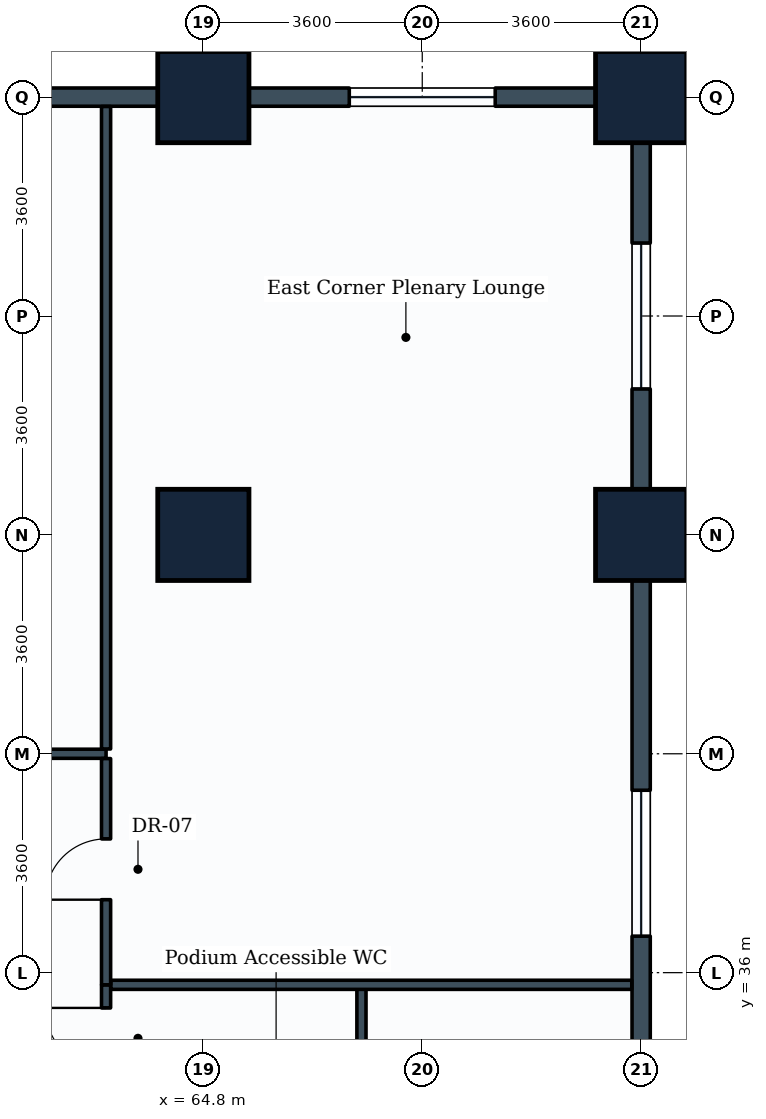
"""IFC4 building model, lengths in metres.
Left out: names, types, materials, properties, quantities, classifications, styles, units other than length and angle.
Written with IfcOpenShell. Run it as: python <this file> out.ifc"""

import sys

from ifc_helpers import new_model, si_unit, direction, frame, frame_2d, origin, origin_2d, place, context, subcontext, project, spatial, rectangle, extrude, element, fill, save


model = new_model("IFC4")
c1 = context("Model", 3, precision=1e-05, world=origin(), true_north=direction((0.0, 1.0)))
c2 = subcontext(c1, "Body", "Model", "MODEL_VIEW")
j1 = project(units=[si_unit("LENGTHUNIT", "METRE"), si_unit("PLANEANGLEUNIT", "RADIAN")], contexts=[c1])
p1 = place(None, origin())
s1 = spatial("IfcSite", under=j1, at=p1, CompositionType="ELEMENT")
p2 = place(p1, origin())
s2 = spatial("IfcBuilding", under=s1, at=p2, CompositionType="ELEMENT")
p3 = place(p2, frame((0.0, 0.0, 5.4)))
s3 = spatial("IfcBuildingStorey", under=s2, at=p3, CompositionType="ELEMENT", Elevation=5.4)
for number, where, z_axis, x_axis in (
    (1, (64.8, 43.2, 0.0), (0.0, 0.0, 1.0), (1.0, 0.0, 0.0)),
    (2, (64.8, 50.4, 0.0), (0.0, 0.0, 1.0), (1.0, 0.0, 0.0)),
    (3, (72.0, 43.2, 0.0), (0.0, 0.0, 1.0), (1.0, 0.0, 0.0)),
    (4, (72.0, 50.4, 0.0), (0.0, 0.0, 1.0), (1.0, 0.0, 0.0)),
):
    element("IfcColumn", number, at=place(p3, frame(where, z_axis=z_axis, x_axis=x_axis)), inside=s3, PredefinedType="COLUMN", context=c2, shape_type="SweptSolid", body=[
        extrude(rectangle(XDim=1.5, YDim=1.5, at=origin_2d()), origin(), (0.0, 0.0, 1.0), 4.8),
    ])
p4 = place(p3, frame((72.0, 43.2, 0.0), z_axis=(0.0, 0.0, 1.0), x_axis=(0.0, -1.0, 0.0)))
e5 = element("IfcWall", 5, at=p4, inside=s3, PredefinedType="STANDARD", context=c2, shape_type="SweptSolid", body=[
    extrude(rectangle(XDim=10.8, YDim=0.3, at=frame_2d((5.4, 0.0))), origin(), (0.0, 0.0, 1.0), 3.83),
])
p5 = place(p4, frame((4.2, 0.0, 0.85)))
e6 = element("IfcOpeningElement", 6, at=p5, cuts=e5, PredefinedType="OPENING", context=c2, shape_type="SweptSolid", body=[
    extrude(rectangle(XDim=2.4, YDim=1.6, at=frame_2d((1.2, 0.8))), frame((0.0, 0.16, 0.0), z_axis=(0.0, -1.0, 0.0), x_axis=(1.0, 0.0, 0.0)), (0.0, 0.0, 1.0), 0.32),
])
p6 = place(p3, frame((72.0, 50.4, 0.0), z_axis=(0.0, 0.0, 1.0), x_axis=(0.0, -1.0, 0.0)))
e7 = element("IfcWall", 7, at=p6, inside=s3, PredefinedType="STANDARD", context=c2, shape_type="SweptSolid", body=[
    extrude(rectangle(XDim=7.2, YDim=0.3, at=frame_2d((3.6, 0.0))), origin(), (0.0, 0.0, 1.0), 3.83),
])
p7 = place(p6, frame((2.4, 0.0, 0.85)))
e8 = element("IfcOpeningElement", 8, at=p7, cuts=e7, PredefinedType="OPENING", context=c2, shape_type="SweptSolid", body=[
    extrude(rectangle(XDim=2.4, YDim=1.6, at=frame_2d((1.2, 0.8))), frame((0.0, 0.16, 0.0), z_axis=(0.0, -1.0, 0.0), x_axis=(1.0, 0.0, 0.0)), (0.0, 0.0, 1.0), 0.32),
])
p8 = place(p3, frame((54.0, 50.4, 0.0), z_axis=(0.0, 0.0, 1.0), x_axis=(1.0, 0.0, 0.0)))
e9 = element("IfcWall", 9, at=p8, inside=s3, PredefinedType="STANDARD", context=c2, shape_type="SweptSolid", body=[
    extrude(rectangle(XDim=10.8, YDim=0.3, at=frame_2d((5.4, 0.0))), origin(), (0.0, 0.0, 1.0), 3.83),
])
p9 = place(p8, frame((4.2, 0.0, 0.85)))
e10 = element("IfcOpeningElement", 10, at=p9, cuts=e9, PredefinedType="OPENING", context=c2, shape_type="SweptSolid", body=[
    extrude(rectangle(XDim=2.4, YDim=1.6, at=frame_2d((1.2, 0.8))), frame((0.0, 0.16, 0.0), z_axis=(0.0, -1.0, 0.0), x_axis=(1.0, 0.0, 0.0)), (0.0, 0.0, 1.0), 0.32),
])
p10 = place(p3, frame((64.8, 50.4, 0.0), z_axis=(0.0, 0.0, 1.0), x_axis=(1.0, 0.0, 0.0)))
e11 = element("IfcWall", 11, at=p10, inside=s3, PredefinedType="STANDARD", context=c2, shape_type="SweptSolid", body=[
    extrude(rectangle(XDim=7.2, YDim=0.3, at=frame_2d((3.6, 0.0))), origin(), (0.0, 0.0, 1.0), 3.83),
])
p11 = place(p10, frame((2.4, 0.0, 0.85)))
e12 = element("IfcOpeningElement", 12, at=p11, cuts=e11, PredefinedType="OPENING", context=c2, shape_type="SweptSolid", body=[
    extrude(rectangle(XDim=2.4, YDim=1.6, at=frame_2d((1.2, 0.8))), frame((0.0, 0.16, 0.0), z_axis=(0.0, -1.0, 0.0), x_axis=(1.0, 0.0, 0.0)), (0.0, 0.0, 1.0), 0.32),
])
p12 = place(p3, frame((40.8, 39.6, 0.0), z_axis=(0.0, 0.0, 1.0), x_axis=(1.0, 0.0, 0.0)))
e13 = element("IfcWall", 13, at=p12, inside=s3, PredefinedType="PARTITIONING", context=c2, shape_type="SweptSolid", body=[
    extrude(rectangle(XDim=22.4, YDim=0.15, at=frame_2d((11.2, 0.0))), origin(), (0.0, 0.0, 1.0), 3.83),
])
p13 = place(p12, frame((10.36, 0.0, 0.0)))
e14 = element("IfcOpeningElement", 14, at=p13, cuts=e13, PredefinedType="OPENING", context=c2, shape_type="SweptSolid", body=[
    extrude(rectangle(XDim=1.6, YDim=2.2, at=frame_2d((0.8, 1.1))), frame((0.0, 0.085, 0.0), z_axis=(0.0, -1.0, 0.0), x_axis=(1.0, 0.0, 0.0)), (0.0, 0.0, 1.0), 0.17),
])
p14 = place(p3, frame((67.4, 32.879, 0.0), z_axis=(0.0, 0.0, 1.0), x_axis=(0.0, 1.0, 0.0)))
e15 = element("IfcWall", 15, at=p14, inside=s3, PredefinedType="PARTITIONING", context=c2, shape_type="SweptSolid", body=[
    extrude(rectangle(XDim=2.921, YDim=0.15, at=frame_2d((1.46, 0.0))), origin(), (0.0, 0.0, 1.0), 4.485),
])
p15 = place(p3, frame((63.2, 32.8, 0.0), z_axis=(0.0, 0.0, 1.0), x_axis=(0.0, 1.0, 0.0)))
e16 = element("IfcWall", 16, at=p15, inside=s3, PredefinedType="PARTITIONING", context=c2, shape_type="SweptSolid", body=[
    extrude(rectangle(XDim=3.0, YDim=0.15, at=frame_2d((1.5, 0.0))), origin(), (0.0, 0.0, 1.0), 4.485),
])
p16 = place(p15, frame((1.62, 0.0, 0.0)))
e17 = element("IfcOpeningElement", 17, at=p16, cuts=e16, PredefinedType="OPENING", context=c2, shape_type="SweptSolid", body=[
    extrude(rectangle(XDim=1.0, YDim=2.1, at=frame_2d((0.5, 1.05))), frame((0.0, 0.085, 0.0), z_axis=(0.0, -1.0, 0.0), x_axis=(1.0, 0.0, 0.0)), (0.0, 0.0, 1.0), 0.17),
])
p17 = place(p3, frame((63.279, 35.8, 0.0), z_axis=(0.0, 0.0, 1.0), x_axis=(1.0, 0.0, 0.0)))
e18 = element("IfcWall", 18, at=p17, inside=s3, PredefinedType="PARTITIONING", context=c2, shape_type="SweptSolid", body=[
    extrude(rectangle(XDim=8.567, YDim=0.15, at=frame_2d((4.283, 0.0))), origin(), (0.0, 0.0, 1.0), 3.83),
])
p18 = place(p3, frame((63.2, 35.8, 0.0), z_axis=(0.0, 0.0, 1.0), x_axis=(0.0, 1.0, 0.0)))
e19 = element("IfcWall", 19, at=p18, inside=s3, PredefinedType="PARTITIONING", context=c2, shape_type="SweptSolid", body=[
    extrude(rectangle(XDim=3.721, YDim=0.15, at=frame_2d((1.86, 0.0))), origin(), (0.0, 0.0, 1.0), 4.485),
])
p19 = place(p18, frame((1.4, 0.0, 0.0)))
e20 = element("IfcOpeningElement", 20, at=p19, cuts=e19, PredefinedType="OPENING", context=c2, shape_type="SweptSolid", body=[
    extrude(rectangle(XDim=1.0, YDim=2.1, at=frame_2d((0.5, 1.05))), frame((0.0, 0.085, 0.0), z_axis=(0.0, -1.0, 0.0), x_axis=(1.0, 0.0, 0.0)), (0.0, 0.0, 1.0), 0.17),
])
p20 = place(p3, frame((63.2, 39.679, 0.0), z_axis=(0.0, 0.0, 1.0), x_axis=(0.0, 1.0, 0.0)))
e21 = element("IfcWall", 21, at=p20, inside=s3, PredefinedType="PARTITIONING", context=c2, shape_type="SweptSolid", body=[
    extrude(rectangle(XDim=10.567, YDim=0.15, at=frame_2d((5.284, 0.0))), origin(), (0.0, 0.0, 1.0), 3.83),
])
p21 = place(p5, origin())
e22 = element("IfcWindow", 22, at=p21, inside=s3, PartitioningType="SINGLE_PANEL", PredefinedType="WINDOW", context=c2, shape_type="SweptSolid", body=[
    extrude(rectangle(XDim=2.4, YDim=1.6, at=frame_2d((1.2, 0.8))), frame((0.0, 0.03, 0.0), z_axis=(0.0, -1.0, 0.0), x_axis=(1.0, 0.0, 0.0)), (0.0, 0.0, 1.0), 0.06),
])
fill(e6, e22)
p22 = place(p7, origin())
e23 = element("IfcWindow", 23, at=p22, inside=s3, PartitioningType="SINGLE_PANEL", PredefinedType="WINDOW", context=c2, shape_type="SweptSolid", body=[
    extrude(rectangle(XDim=2.4, YDim=1.6, at=frame_2d((1.2, 0.8))), frame((0.0, 0.03, 0.0), z_axis=(0.0, -1.0, 0.0), x_axis=(1.0, 0.0, 0.0)), (0.0, 0.0, 1.0), 0.06),
])
fill(e8, e23)
p23 = place(p11, origin())
e24 = element("IfcWindow", 24, at=p23, inside=s3, PartitioningType="SINGLE_PANEL", PredefinedType="WINDOW", context=c2, shape_type="SweptSolid", body=[
    extrude(rectangle(XDim=2.4, YDim=1.6, at=frame_2d((1.2, 0.8))), frame((0.0, 0.03, 0.0), z_axis=(0.0, -1.0, 0.0), x_axis=(1.0, 0.0, 0.0)), (0.0, 0.0, 1.0), 0.06),
])
fill(e12, e24)
p24 = place(p16, origin())
e25 = element("IfcDoor", 25, at=p24, inside=s3, OperationType="SINGLE_SWING_RIGHT", PredefinedType="DOOR", context=c2, shape_type="SweptSolid", body=[
    extrude(rectangle(XDim=1.0, YDim=2.1, at=frame_2d((0.5, 1.05))), frame((0.0, 0.025, 0.0), z_axis=(0.0, -1.0, 0.0), x_axis=(1.0, 0.0, 0.0)), (0.0, 0.0, 1.0), 0.05),
])
fill(e17, e25)
p25 = place(p19, origin())
e26 = element("IfcDoor", 26, at=p25, inside=s3, OperationType="SINGLE_SWING_LEFT", PredefinedType="DOOR", context=c2, shape_type="SweptSolid", body=[
    extrude(rectangle(XDim=1.0, YDim=2.1, at=frame_2d((0.5, 1.05))), frame((0.0, 0.025, 0.0), z_axis=(0.0, -1.0, 0.0), x_axis=(1.0, 0.0, 0.0)), (0.0, 0.0, 1.0), 0.05),
])
fill(e20, e26)
save(model, sys.argv[1])
